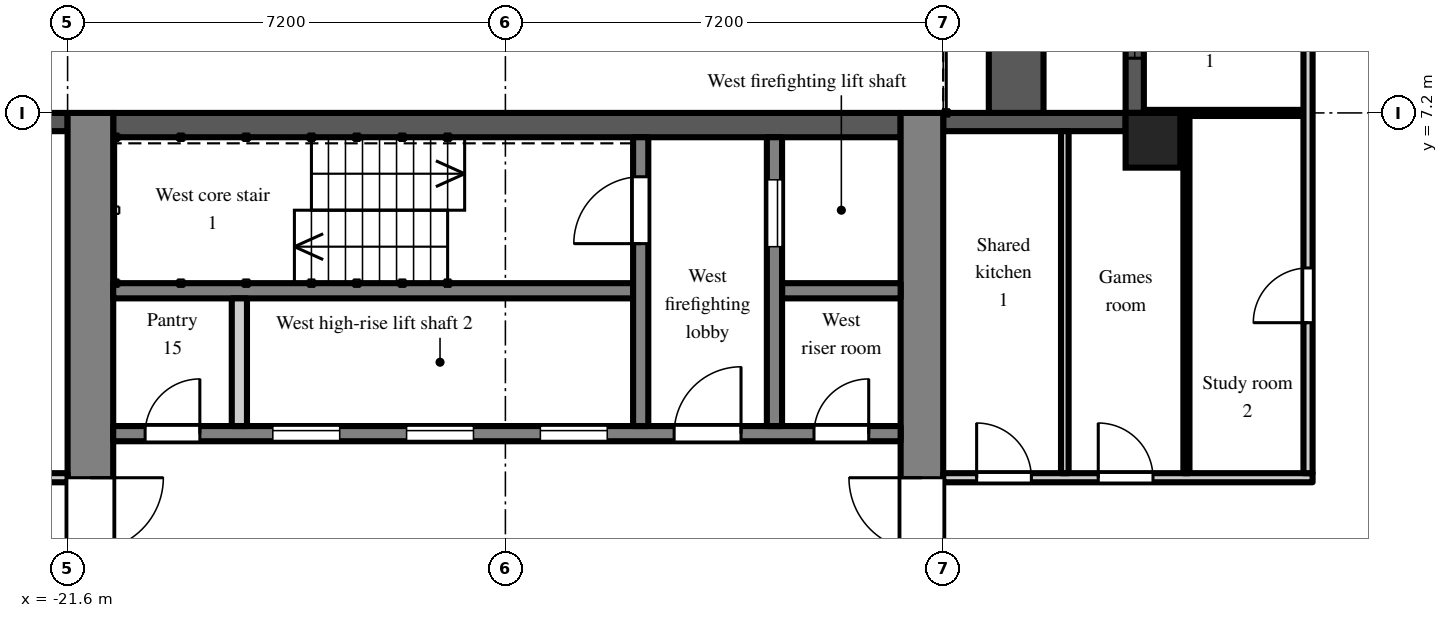
"""IFC4 building model, lengths in metres.
Left out: names, types, materials, properties, quantities, classifications, styles, units other than length and angle.
Written with IfcOpenShell. Run it as: python <this file> out.ifc"""

import sys

from ifc_helpers import new_model, si_unit, direction, frame, frame_2d, origin, origin_2d, place, context, subcontext, project, spatial, rectangle, extrude, element, fill, save


model = new_model("IFC4")
c1 = context("Model", 3, precision=1e-05, world=origin(), true_north=direction((0.0, 1.0)))
c2 = subcontext(c1, "Body", "Model", "MODEL_VIEW")
j1 = project(units=[si_unit("LENGTHUNIT", "METRE"), si_unit("PLANEANGLEUNIT", "RADIAN")], contexts=[c1])
p1 = place(None, origin())
s1 = spatial("IfcSite", under=j1, at=p1, CompositionType="ELEMENT")
p2 = place(p1, origin())
s2 = spatial("IfcBuilding", under=s1, at=p2, CompositionType="ELEMENT")
p3 = place(p2, frame((0.0, 0.0, 207.9)))
s3 = spatial("IfcBuildingStorey", under=s2, at=p3, CompositionType="ELEMENT", Elevation=207.9)
p4 = place(p3, frame((-3.75, 6.75, 0.0), z_axis=(0.0, 0.0, 1.0), x_axis=(1.0, 0.0, 0.0)))
e1 = element("IfcColumn", 1, at=p4, inside=s3, PredefinedType="COLUMN", context=c2, shape_type="SweptSolid", body=[
    extrude(rectangle(XDim=0.9, YDim=0.9, at=origin_2d()), origin(), (0.0, 0.0, 1.0), 3.0),
])
p5 = place(p3, frame((-4.05, 14.4, 0.0), z_axis=(0.0, 0.0, 1.0), x_axis=(0.0, -1.0, 0.0)))
e2 = element("IfcWall", 2, at=p5, inside=s3, PredefinedType="SOLIDWALL", context=c2, shape_type="SweptSolid", body=[
    extrude(rectangle(XDim=7.2, YDim=0.3, at=frame_2d((3.6, 0.0))), origin(), (0.0, 0.0, 1.0), 2.3),
])
p6 = place(p5, frame((3.0, 0.0, 0.0)))
e3 = element("IfcOpeningElement", 3, at=p6, cuts=e2, PredefinedType="OPENING", context=c2, shape_type="SweptSolid", body=[
    extrude(rectangle(XDim=1.2, YDim=2.05, at=frame_2d((0.6, 1.025))), frame((0.0, 0.16, 0.0), z_axis=(0.0, -1.0, 0.0), x_axis=(1.0, 0.0, 0.0)), (0.0, 0.0, 1.0), 0.32),
])
p7 = place(p5, frame((0.9, 0.0, 0.2)))
e4 = element("IfcOpeningElement", 4, at=p7, cuts=e2, PredefinedType="OPENING", context=c2, shape_type="SweptSolid", body=[
    extrude(rectangle(XDim=1.8, YDim=1.85, at=frame_2d((0.9, 0.925))), frame((0.0, 0.16, 0.0), z_axis=(0.0, -1.0, 0.0), x_axis=(1.0, 0.0, 0.0)), (0.0, 0.0, 1.0), 0.32),
])
p8 = place(p5, frame((4.5, 0.0, 0.2)))
e5 = element("IfcOpeningElement", 5, at=p8, cuts=e2, PredefinedType="OPENING", context=c2, shape_type="SweptSolid", body=[
    extrude(rectangle(XDim=1.8, YDim=1.85, at=frame_2d((0.9, 0.925))), frame((0.0, 0.16, 0.0), z_axis=(0.0, -1.0, 0.0), x_axis=(1.0, 0.0, 0.0)), (0.0, 0.0, 1.0), 0.32),
])
p9 = place(p3, frame((-4.2, 7.05, 0.0), z_axis=(0.0, 0.0, 1.0), x_axis=(-1.0, 0.0, 0.0)))
e6 = element("IfcWall", 6, at=p9, inside=s3, PredefinedType="SOLIDWALL", context=c2, shape_type="SweptSolid", body=[
    extrude(rectangle(XDim=3.0, YDim=0.3, at=frame_2d((1.5, 0.0))), origin(), (0.0, 0.0, 1.0), 2.3),
])
p10 = place(p3, frame((-21.6, 7.05, 0.0), z_axis=(0.0, 0.0, 1.0), x_axis=(-1.0, 0.0, 0.0)))
e7 = element("IfcWall", 7, at=p10, inside=s3, PredefinedType="SOLIDWALL", context=c2, shape_type="SweptSolid", body=[
    extrude(rectangle(XDim=2.7, YDim=0.3, at=frame_2d((1.35, 0.0))), origin(), (0.0, 0.0, 1.0), 2.3),
])
p11 = place(p10, frame((0.75, 0.0, 0.2)))
e8 = element("IfcOpeningElement", 8, at=p11, cuts=e7, PredefinedType="OPENING", context=c2, shape_type="SweptSolid", body=[
    extrude(rectangle(XDim=1.2, YDim=1.85, at=frame_2d((0.6, 0.925))), frame((0.0, 0.16, 0.0), z_axis=(0.0, -1.0, 0.0), x_axis=(1.0, 0.0, 0.0)), (0.0, 0.0, 1.0), 0.32),
])
p12 = place(p3, frame((-6.0, 7.2, 0.0), z_axis=(0.0, 0.0, 1.0), x_axis=(0.0, 1.0, 0.0)))
e9 = element("IfcWall", 9, at=p12, inside=s3, PredefinedType="PARAPET", context=c2, shape_type="SweptSolid", body=[
    extrude(rectangle(XDim=7.2, YDim=0.9, at=frame_2d((3.6, 0.0))), origin(), (0.0, 0.0, 1.0), 0.8),
])
p13 = place(p3, frame((-7.55, -7.2, 0.0), z_axis=(0.0, 0.0, 1.0), x_axis=(0.0, 1.0, 0.0)))
e10 = element("IfcWall", 10, at=p13, inside=s3, PredefinedType="SHEAR", context=c2, shape_type="SweptSolid", body=[
    extrude(rectangle(XDim=14.4, YDim=0.7, at=frame_2d((7.2, 0.0))), origin(), (0.0, 0.0, 1.0), 2.6),
])
p14 = place(p13, frame((6.0, 0.0, 0.0)))
e11 = element("IfcOpeningElement", 11, at=p14, cuts=e10, PredefinedType="OPENING", context=c2, shape_type="SweptSolid", body=[
    extrude(rectangle(XDim=2.4, YDim=2.2, at=frame_2d((1.2, 1.1))), frame((0.0, 0.36, 0.0), z_axis=(0.0, -1.0, 0.0), x_axis=(1.0, 0.0, 0.0)), (0.0, 0.0, 1.0), 0.72),
])
p15 = place(p3, frame((-21.225, -7.2, 0.0), z_axis=(0.0, 0.0, 1.0), x_axis=(0.0, 1.0, 0.0)))
e12 = element("IfcWall", 12, at=p15, inside=s3, PredefinedType="SHEAR", context=c2, shape_type="SweptSolid", body=[
    extrude(rectangle(XDim=14.4, YDim=0.75, at=frame_2d((7.2, 0.0))), origin(), (0.0, 0.0, 1.0), 2.6),
])
p16 = place(p15, frame((6.0, 0.0, 0.0)))
e13 = element("IfcOpeningElement", 13, at=p16, cuts=e12, PredefinedType="OPENING", context=c2, shape_type="SweptSolid", body=[
    extrude(rectangle(XDim=2.4, YDim=2.2, at=frame_2d((1.2, 1.1))), frame((0.0, 0.385, 0.0), z_axis=(0.0, -1.0, 0.0), x_axis=(1.0, 0.0, 0.0)), (0.0, 0.0, 1.0), 0.77),
])
p17 = place(p3, frame((-7.9, 7.0, 0.0), z_axis=(0.0, 0.0, 1.0), x_axis=(-1.0, 0.0, 0.0)))
e14 = element("IfcWall", 14, at=p17, inside=s3, PredefinedType="SHEAR", context=c2, shape_type="SweptSolid", body=[
    extrude(rectangle(XDim=12.95, YDim=0.4, at=frame_2d((6.475, 0.0))), origin(), (0.0, 0.0, 1.0), 2.6),
])
p18 = place(p3, frame((-7.9, 1.925, 0.0), z_axis=(0.0, 0.0, 1.0), x_axis=(-1.0, 0.0, 0.0)))
e15 = element("IfcWall", 15, at=p18, inside=s3, PredefinedType="SHEAR", context=c2, shape_type="SweptSolid", body=[
    extrude(rectangle(XDim=12.95, YDim=0.25, at=frame_2d((6.475, 0.0))), origin(), (0.0, 0.0, 1.0), 2.6),
])
p19 = place(p18, frame((4.825, 0.0, 0.0)))
e16 = element("IfcOpeningElement", 16, at=p19, cuts=e15, PredefinedType="OPENING", context=c2, shape_type="SweptSolid", body=[
    extrude(rectangle(XDim=1.1, YDim=2.1, at=frame_2d((0.55, 1.05))), frame((0.0, 0.135, 0.0), z_axis=(0.0, -1.0, 0.0), x_axis=(1.0, 0.0, 0.0)), (0.0, 0.0, 1.0), 0.27),
])
p20 = place(p18, frame((7.025, 0.0, 0.0)))
e17 = element("IfcOpeningElement", 17, at=p20, cuts=e15, PredefinedType="OPENING", context=c2, shape_type="SweptSolid", body=[
    extrude(rectangle(XDim=1.1, YDim=2.1, at=frame_2d((0.55, 1.05))), frame((0.0, 0.135, 0.0), z_axis=(0.0, -1.0, 0.0), x_axis=(1.0, 0.0, 0.0)), (0.0, 0.0, 1.0), 0.27),
])
p21 = place(p18, frame((9.225, 0.0, 0.0)))
e18 = element("IfcOpeningElement", 18, at=p21, cuts=e15, PredefinedType="OPENING", context=c2, shape_type="SweptSolid", body=[
    extrude(rectangle(XDim=1.1, YDim=2.1, at=frame_2d((0.55, 1.05))), frame((0.0, 0.135, 0.0), z_axis=(0.0, -1.0, 0.0), x_axis=(1.0, 0.0, 0.0)), (0.0, 0.0, 1.0), 0.27),
])
p22 = place(p18, frame((0.525, 0.0, 0.0)))
e19 = element("IfcOpeningElement", 19, at=p22, cuts=e15, PredefinedType="OPENING", context=c2, shape_type="SweptSolid", body=[
    extrude(rectangle(XDim=0.9, YDim=2.1, at=frame_2d((0.45, 1.05))), frame((0.0, 0.135, 0.0), z_axis=(0.0, -1.0, 0.0), x_axis=(1.0, 0.0, 0.0)), (0.0, 0.0, 1.0), 0.27),
])
p23 = place(p18, frame((2.625, 0.0, 0.0)))
e20 = element("IfcOpeningElement", 20, at=p23, cuts=e15, PredefinedType="OPENING", context=c2, shape_type="SweptSolid", body=[
    extrude(rectangle(XDim=1.1, YDim=2.1, at=frame_2d((0.55, 1.05))), frame((0.0, 0.135, 0.0), z_axis=(0.0, -1.0, 0.0), x_axis=(1.0, 0.0, 0.0)), (0.0, 0.0, 1.0), 0.27),
])
p24 = place(p18, frame((11.525, 0.0, 0.0)))
e21 = element("IfcOpeningElement", 21, at=p24, cuts=e15, PredefinedType="OPENING", context=c2, shape_type="SweptSolid", body=[
    extrude(rectangle(XDim=0.9, YDim=2.1, at=frame_2d((0.45, 1.05))), frame((0.0, 0.135, 0.0), z_axis=(0.0, -1.0, 0.0), x_axis=(1.0, 0.0, 0.0)), (0.0, 0.0, 1.0), 0.27),
])
p25 = place(p3, frame((-7.9, 4.275, 0.0), z_axis=(0.0, 0.0, 1.0), x_axis=(-1.0, 0.0, 0.0)))
e22 = element("IfcWall", 22, at=p25, inside=s3, PredefinedType="SHEAR", context=c2, shape_type="SweptSolid", body=[
    extrude(rectangle(XDim=1.95, YDim=0.25, at=frame_2d((0.975, 0.0))), origin(), (0.0, 0.0, 1.0), 2.6),
])
p26 = place(p3, frame((-12.3, 4.275, 0.0), z_axis=(0.0, 0.0, 1.0), x_axis=(-1.0, 0.0, 0.0)))
e23 = element("IfcWall", 23, at=p26, inside=s3, PredefinedType="SHEAR", context=c2, shape_type="SweptSolid", body=[
    extrude(rectangle(XDim=8.55, YDim=0.25, at=frame_2d((4.275, 0.0))), origin(), (0.0, 0.0, 1.0), 2.6),
])
p27 = place(p3, frame((-9.975, 2.05, 0.0), z_axis=(0.0, 0.0, 1.0), x_axis=(0.0, 1.0, 0.0)))
e24 = element("IfcWall", 24, at=p27, inside=s3, PredefinedType="SHEAR", context=c2, shape_type="SweptSolid", body=[
    extrude(rectangle(XDim=4.75, YDim=0.25, at=frame_2d((2.375, 0.0))), origin(), (0.0, 0.0, 1.0), 2.6),
])
p28 = place(p27, frame((2.95, 0.0, 0.0)))
e25 = element("IfcOpeningElement", 25, at=p28, cuts=e24, PredefinedType="OPENING", context=c2, shape_type="SweptSolid", body=[
    extrude(rectangle(XDim=1.1, YDim=2.1, at=frame_2d((0.55, 1.05))), frame((0.0, 0.135, 0.0), z_axis=(0.0, -1.0, 0.0), x_axis=(1.0, 0.0, 0.0)), (0.0, 0.0, 1.0), 0.27),
])
p29 = place(p3, frame((-12.175, 2.05, 0.0), z_axis=(0.0, 0.0, 1.0), x_axis=(0.0, 1.0, 0.0)))
e26 = element("IfcWall", 26, at=p29, inside=s3, PredefinedType="SHEAR", context=c2, shape_type="SweptSolid", body=[
    extrude(rectangle(XDim=4.75, YDim=0.25, at=frame_2d((2.375, 0.0))), origin(), (0.0, 0.0, 1.0), 2.6),
])
p30 = place(p29, frame((3.0, 0.0, 0.0)))
e27 = element("IfcOpeningElement", 27, at=p30, cuts=e26, PredefinedType="OPENING", context=c2, shape_type="SweptSolid", body=[
    extrude(rectangle(XDim=1.1, YDim=2.1, at=frame_2d((0.55, 1.05))), frame((0.0, 0.135, 0.0), z_axis=(0.0, -1.0, 0.0), x_axis=(1.0, 0.0, 0.0)), (0.0, 0.0, 1.0), 0.27),
])
p31 = place(p3, frame((-18.775, 2.05, 0.0), z_axis=(0.0, 0.0, 1.0), x_axis=(0.0, 1.0, 0.0)))
e28 = element("IfcWall", 28, at=p31, inside=s3, PredefinedType="PARTITIONING", context=c2, shape_type="SweptSolid", body=[
    extrude(rectangle(XDim=2.1, YDim=0.25, at=frame_2d((1.05, 0.0))), origin(), (0.0, 0.0, 1.0), 2.6),
])
p32 = place(p3, frame((-26.725, 1.2, 0.0), z_axis=(0.0, 0.0, 1.0), x_axis=(1.0, 0.0, 0.0)))
e29 = element("IfcWall", 29, at=p32, inside=s3, PredefinedType="PARTITIONING", context=c2, shape_type="SweptSolid", body=[
    extrude(rectangle(XDim=5.125, YDim=0.15, at=frame_2d((2.562, 0.0))), origin(), (0.0, 0.0, 1.0), 2.6),
])
p33 = place(p32, frame((2.875, 0.0, 0.0)))
e30 = element("IfcOpeningElement", 30, at=p33, cuts=e29, PredefinedType="OPENING", context=c2, shape_type="SweptSolid", body=[
    extrude(rectangle(XDim=0.9, YDim=2.1, at=frame_2d((0.45, 1.05))), frame((0.0, 0.085, 0.0), z_axis=(0.0, -1.0, 0.0), x_axis=(1.0, 0.0, 0.0)), (0.0, 0.0, 1.0), 0.17),
])
p34 = place(p32, frame((0.275, 0.0, 0.0)))
e31 = element("IfcOpeningElement", 31, at=p34, cuts=e29, PredefinedType="OPENING", context=c2, shape_type="SweptSolid", body=[
    extrude(rectangle(XDim=0.9, YDim=2.1, at=frame_2d((0.45, 1.05))), frame((0.0, 0.085, 0.0), z_axis=(0.0, -1.0, 0.0), x_axis=(1.0, 0.0, 0.0)), (0.0, 0.0, 1.0), 0.17),
])
p35 = place(p3, frame((-7.2, 1.2, 0.0), z_axis=(0.0, 0.0, 1.0), x_axis=(1.0, 0.0, 0.0)))
e32 = element("IfcWall", 32, at=p35, inside=s3, PredefinedType="PARTITIONING", context=c2, shape_type="SweptSolid", body=[
    extrude(rectangle(XDim=6.075, YDim=0.15, at=frame_2d((3.038, 0.0))), origin(), (0.0, 0.0, 1.0), 2.6),
])
p36 = place(p35, frame((2.55, 0.0, 0.0)))
e33 = element("IfcOpeningElement", 33, at=p36, cuts=e32, PredefinedType="OPENING", context=c2, shape_type="SweptSolid", body=[
    extrude(rectangle(XDim=0.9, YDim=2.1, at=frame_2d((0.45, 1.05))), frame((0.0, 0.085, 0.0), z_axis=(0.0, -1.0, 0.0), x_axis=(1.0, 0.0, 0.0)), (0.0, 0.0, 1.0), 0.17),
])
p37 = place(p35, frame((0.55, 0.0, 0.0)))
e34 = element("IfcOpeningElement", 34, at=p37, cuts=e32, PredefinedType="OPENING", context=c2, shape_type="SweptSolid", body=[
    extrude(rectangle(XDim=0.9, YDim=2.1, at=frame_2d((0.45, 1.05))), frame((0.0, 0.085, 0.0), z_axis=(0.0, -1.0, 0.0), x_axis=(1.0, 0.0, 0.0)), (0.0, 0.0, 1.0), 0.17),
])
p38 = place(p3, frame((-5.2, 1.275, 0.0), z_axis=(0.0, 0.0, 1.0), x_axis=(0.0, 1.0, 0.0)))
e35 = element("IfcWall", 35, at=p38, inside=s3, PredefinedType="PARTITIONING", context=c2, shape_type="SweptSolid", body=[
    extrude(rectangle(XDim=5.625, YDim=0.125, at=frame_2d((2.812, 0.0))), origin(), (0.0, 0.0, 1.0), 2.6),
])
p39 = place(p3, frame((-3.9, 7.2, 0.0), z_axis=(0.0, 0.0, 1.0), x_axis=(1.0, 0.0, 0.0)))
e36 = element("IfcWall", 36, at=p39, inside=s3, PredefinedType="PARTITIONING", context=c2, shape_type="SweptSolid", body=[
    extrude(rectangle(XDim=2.625, YDim=0.1, at=frame_2d((1.312, 0.0))), origin(), (0.0, 0.0, 1.0), 2.6),
])
p40 = place(p3, frame((-3.2, 1.275, 0.0), z_axis=(0.0, 0.0, 1.0), x_axis=(0.0, 1.0, 0.0)))
e37 = element("IfcWall", 37, at=p40, inside=s3, PredefinedType="PARTITIONING", context=c2, shape_type="SweptSolid", body=[
    extrude(rectangle(XDim=5.875, YDim=0.1, at=frame_2d((2.938, 0.0))), origin(), (0.0, 0.0, 1.0), 2.6),
])
p41 = place(p3, frame((-1.2, 1.275, 0.0), z_axis=(0.0, 0.0, 1.0), x_axis=(0.0, 1.0, 0.0)))
e38 = element("IfcWall", 38, at=p41, inside=s3, PredefinedType="PARTITIONING", context=c2, shape_type="SweptSolid", body=[
    extrude(rectangle(XDim=18.25, YDim=0.15, at=frame_2d((9.125, 0.0))), origin(), (0.0, 0.0, 1.0), 2.6),
])
p42 = place(p41, frame((2.475, 0.0, 0.0)))
e39 = element("IfcOpeningElement", 39, at=p42, cuts=e38, PredefinedType="OPENING", context=c2, shape_type="SweptSolid", body=[
    extrude(rectangle(XDim=0.9, YDim=2.1, at=frame_2d((0.45, 1.05))), frame((0.0, 0.085, 0.0), z_axis=(0.0, -1.0, 0.0), x_axis=(1.0, 0.0, 0.0)), (0.0, 0.0, 1.0), 0.17),
])
p43 = place(p41, frame((11.275, 0.0, 0.0)))
e40 = element("IfcOpeningElement", 40, at=p43, cuts=e38, PredefinedType="OPENING", context=c2, shape_type="SweptSolid", body=[
    extrude(rectangle(XDim=0.9, YDim=2.1, at=frame_2d((0.45, 1.05))), frame((0.0, 0.085, 0.0), z_axis=(0.0, -1.0, 0.0), x_axis=(1.0, 0.0, 0.0)), (0.0, 0.0, 1.0), 0.17),
])
p44 = place(p41, frame((7.675, 0.0, 0.0)))
e41 = element("IfcOpeningElement", 41, at=p44, cuts=e38, PredefinedType="OPENING", context=c2, shape_type="SweptSolid", body=[
    extrude(rectangle(XDim=0.9, YDim=2.1, at=frame_2d((0.45, 1.05))), frame((0.0, 0.085, 0.0), z_axis=(0.0, -1.0, 0.0), x_axis=(1.0, 0.0, 0.0)), (0.0, 0.0, 1.0), 0.17),
])
p45 = place(p41, frame((13.725, 0.0, 0.0)))
e42 = element("IfcOpeningElement", 42, at=p45, cuts=e38, PredefinedType="OPENING", context=c2, shape_type="SweptSolid", body=[
    extrude(rectangle(XDim=1.0, YDim=2.1, at=frame_2d((0.5, 1.05))), frame((0.0, 0.085, 0.0), z_axis=(0.0, -1.0, 0.0), x_axis=(1.0, 0.0, 0.0)), (0.0, 0.0, 1.0), 0.17),
])
p46 = place(p41, frame((17.075, 0.0, 0.0)))
e43 = element("IfcOpeningElement", 43, at=p46, cuts=e38, PredefinedType="OPENING", context=c2, shape_type="SweptSolid", body=[
    extrude(rectangle(XDim=0.9, YDim=2.1, at=frame_2d((0.45, 1.05))), frame((0.0, 0.085, 0.0), z_axis=(0.0, -1.0, 0.0), x_axis=(1.0, 0.0, 0.0)), (0.0, 0.0, 1.0), 0.17),
])
p47 = place(p8, origin())
e44 = element("IfcWindow", 44, at=p47, inside=s3, PartitioningType="SINGLE_PANEL", PredefinedType="WINDOW", context=c2, shape_type="SweptSolid", body=[
    extrude(rectangle(XDim=1.8, YDim=1.85, at=frame_2d((0.9, 0.925))), frame((0.0, 0.03, 0.0), z_axis=(0.0, -1.0, 0.0), x_axis=(1.0, 0.0, 0.0)), (0.0, 0.0, 1.0), 0.06),
])
fill(e5, e44)
p48 = place(p19, origin())
e45 = element("IfcDoor", 45, at=p48, inside=s3, OperationType="SLIDING_TO_LEFT", PredefinedType="DOOR", context=c2, shape_type="SweptSolid", body=[
    extrude(rectangle(XDim=1.1, YDim=2.1, at=frame_2d((0.55, 1.05))), frame((0.0, 0.025, 0.0), z_axis=(0.0, -1.0, 0.0), x_axis=(1.0, 0.0, 0.0)), (0.0, 0.0, 1.0), 0.05),
])
fill(e16, e45)
p49 = place(p20, origin())
e46 = element("IfcDoor", 46, at=p49, inside=s3, OperationType="SLIDING_TO_LEFT", PredefinedType="DOOR", context=c2, shape_type="SweptSolid", body=[
    extrude(rectangle(XDim=1.1, YDim=2.1, at=frame_2d((0.55, 1.05))), frame((0.0, 0.025, 0.0), z_axis=(0.0, -1.0, 0.0), x_axis=(1.0, 0.0, 0.0)), (0.0, 0.0, 1.0), 0.05),
])
fill(e17, e46)
p50 = place(p21, origin())
e47 = element("IfcDoor", 47, at=p50, inside=s3, OperationType="SLIDING_TO_LEFT", PredefinedType="DOOR", context=c2, shape_type="SweptSolid", body=[
    extrude(rectangle(XDim=1.1, YDim=2.1, at=frame_2d((0.55, 1.05))), frame((0.0, 0.025, 0.0), z_axis=(0.0, -1.0, 0.0), x_axis=(1.0, 0.0, 0.0)), (0.0, 0.0, 1.0), 0.05),
])
fill(e18, e47)
p51 = place(p28, origin())
e48 = element("IfcDoor", 48, at=p51, inside=s3, OperationType="SLIDING_TO_LEFT", PredefinedType="DOOR", context=c2, shape_type="SweptSolid", body=[
    extrude(rectangle(XDim=1.1, YDim=2.1, at=frame_2d((0.55, 1.05))), frame((0.0, 0.025, 0.0), z_axis=(0.0, -1.0, 0.0), x_axis=(1.0, 0.0, 0.0)), (0.0, 0.0, 1.0), 0.05),
])
fill(e25, e48)
p52 = place(p30, origin())
e49 = element("IfcDoor", 49, at=p52, inside=s3, OperationType="SINGLE_SWING_LEFT", PredefinedType="DOOR", context=c2, shape_type="SweptSolid", body=[
    extrude(rectangle(XDim=1.1, YDim=2.1, at=frame_2d((0.55, 1.05))), frame((0.0, 0.025, 0.0), z_axis=(0.0, -1.0, 0.0), x_axis=(1.0, 0.0, 0.0)), (0.0, 0.0, 1.0), 0.05),
])
fill(e27, e49)
p53 = place(p22, frame((0.9, 0.0, 0.0), z_axis=(0.0, 0.0, 1.0), x_axis=(-1.0, 0.0, 0.0)))
e50 = element("IfcDoor", 50, at=p53, inside=s3, OperationType="SINGLE_SWING_RIGHT", PredefinedType="DOOR", context=c2, shape_type="SweptSolid", body=[
    extrude(rectangle(XDim=0.9, YDim=2.1, at=frame_2d((0.45, 1.05))), frame((0.0, 0.025, 0.0), z_axis=(0.0, -1.0, 0.0), x_axis=(1.0, 0.0, 0.0)), (0.0, 0.0, 1.0), 0.05),
])
fill(e19, e50)
p54 = place(p23, frame((1.1, 0.0, 0.0), z_axis=(0.0, 0.0, 1.0), x_axis=(-1.0, 0.0, 0.0)))
e51 = element("IfcDoor", 51, at=p54, inside=s3, OperationType="SINGLE_SWING_RIGHT", PredefinedType="DOOR", context=c2, shape_type="SweptSolid", body=[
    extrude(rectangle(XDim=1.1, YDim=2.1, at=frame_2d((0.55, 1.05))), frame((0.0, 0.025, 0.0), z_axis=(0.0, -1.0, 0.0), x_axis=(1.0, 0.0, 0.0)), (0.0, 0.0, 1.0), 0.05),
])
fill(e20, e51)
p55 = place(p14, origin())
e52 = element("IfcDoor", 52, at=p55, inside=s3, OperationType="DOUBLE_DOOR_DOUBLE_SWING", PredefinedType="DOOR", context=c2, shape_type="SweptSolid", body=[
    extrude(rectangle(XDim=2.4, YDim=2.2, at=frame_2d((1.2, 1.1))), frame((0.0, 0.025, 0.0), z_axis=(0.0, -1.0, 0.0), x_axis=(1.0, 0.0, 0.0)), (0.0, 0.0, 1.0), 0.05),
])
fill(e11, e52)
p56 = place(p16, frame((2.4, 0.0, 0.0), z_axis=(0.0, 0.0, 1.0), x_axis=(-1.0, 0.0, 0.0)))
e53 = element("IfcDoor", 53, at=p56, inside=s3, OperationType="DOUBLE_DOOR_DOUBLE_SWING", PredefinedType="DOOR", context=c2, shape_type="SweptSolid", body=[
    extrude(rectangle(XDim=2.4, YDim=2.2, at=frame_2d((1.2, 1.1))), frame((0.0, 0.025, 0.0), z_axis=(0.0, -1.0, 0.0), x_axis=(1.0, 0.0, 0.0)), (0.0, 0.0, 1.0), 0.05),
])
fill(e13, e53)
p57 = place(p24, frame((0.9, 0.0, 0.0), z_axis=(0.0, 0.0, 1.0), x_axis=(-1.0, 0.0, 0.0)))
e54 = element("IfcDoor", 54, at=p57, inside=s3, OperationType="SINGLE_SWING_RIGHT", PredefinedType="DOOR", context=c2, shape_type="SweptSolid", body=[
    extrude(rectangle(XDim=0.9, YDim=2.1, at=frame_2d((0.45, 1.05))), frame((0.0, 0.025, 0.0), z_axis=(0.0, -1.0, 0.0), x_axis=(1.0, 0.0, 0.0)), (0.0, 0.0, 1.0), 0.05),
])
fill(e21, e54)
p58 = place(p42, origin())
e55 = element("IfcDoor", 55, at=p58, inside=s3, OperationType="SINGLE_SWING_LEFT", PredefinedType="DOOR", context=c2, shape_type="SweptSolid", body=[
    extrude(rectangle(XDim=0.9, YDim=2.1, at=frame_2d((0.45, 1.05))), frame((0.0, 0.025, 0.0), z_axis=(0.0, -1.0, 0.0), x_axis=(1.0, 0.0, 0.0)), (0.0, 0.0, 1.0), 0.05),
])
fill(e39, e55)
p59 = place(p36, origin())
e56 = element("IfcDoor", 56, at=p59, inside=s3, OperationType="SINGLE_SWING_LEFT", PredefinedType="DOOR", context=c2, shape_type="SweptSolid", body=[
    extrude(rectangle(XDim=0.9, YDim=2.1, at=frame_2d((0.45, 1.05))), frame((0.0, 0.025, 0.0), z_axis=(0.0, -1.0, 0.0), x_axis=(1.0, 0.0, 0.0)), (0.0, 0.0, 1.0), 0.05),
])
fill(e33, e56)
p60 = place(p37, origin())
e57 = element("IfcDoor", 57, at=p60, inside=s3, OperationType="SINGLE_SWING_LEFT", PredefinedType="DOOR", context=c2, shape_type="SweptSolid", body=[
    extrude(rectangle(XDim=0.9, YDim=2.1, at=frame_2d((0.45, 1.05))), frame((0.0, 0.025, 0.0), z_axis=(0.0, -1.0, 0.0), x_axis=(1.0, 0.0, 0.0)), (0.0, 0.0, 1.0), 0.05),
])
fill(e34, e57)
save(model, sys.argv[1])
